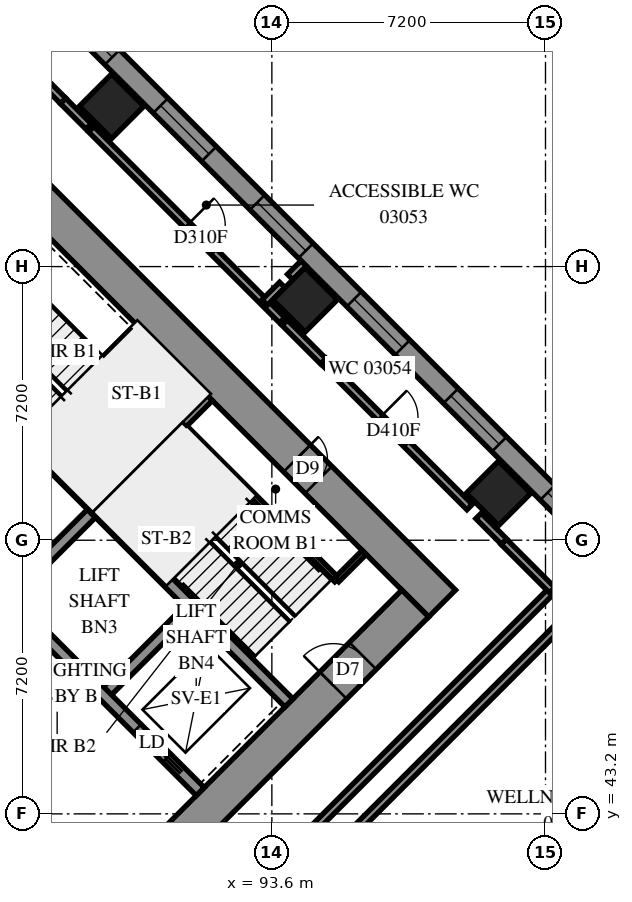
"""IFC4 building model, lengths in metres.
Left out: names, types, materials, properties, quantities, classifications, styles, units other than length and angle.
Written with IfcOpenShell. Run it as: python <this file> out.ifc"""

import sys

from ifc_helpers import new_model, si_unit, direction, frame, frame_2d, origin, origin_2d, place, context, subcontext, project, spatial, polyline, rectangle, outline, extrude, element, fill, save


model = new_model("IFC4")
c1 = context("Model", 3, precision=1e-05, world=origin(), true_north=direction((0.0, 1.0)))
c2 = subcontext(c1, "Body", "Model", "MODEL_VIEW")
j1 = project(units=[si_unit("LENGTHUNIT", "METRE"), si_unit("PLANEANGLEUNIT", "RADIAN")], contexts=[c1])
p1 = place(None, origin())
s1 = spatial("IfcSite", under=j1, at=p1, CompositionType="ELEMENT")
p2 = place(p1, origin())
s2 = spatial("IfcBuilding", under=s1, at=p2, CompositionType="ELEMENT")
p3 = place(p2, frame((0.0, 0.0, 14.4)))
s3 = spatial("IfcBuildingStorey", under=s2, at=p3, CompositionType="ELEMENT", Elevation=14.4)
for number, where, z_axis, x_axis in (
    (1, (89.382, 61.818, 0.0), (0.0, 0.0, 1.0), (0.707, -0.707, 0.0)),
    (2, (94.474, 56.727, 0.0), (0.0, 0.0, 1.0), (0.707, -0.707, 0.0)),
    (3, (99.565, 51.635, 0.0), (0.0, 0.0, 1.0), (0.707, -0.707, 0.0)),
):
    element("IfcColumn", number, at=place(p3, frame(where, z_axis=z_axis, x_axis=x_axis)), inside=s3, PredefinedType="COLUMN", context=c2, shape_type="SweptSolid", body=[
        extrude(rectangle(XDim=1.2, YDim=1.2, at=origin_2d()), origin(), (0.0, 0.0, 1.0), 3.8),
    ])
p4 = place(p3, frame((86.483, 60.333, -0.4), z_axis=(0.0, 0.0, 1.0), x_axis=(0.70710983, -0.7071037324, 0.0)))
e4 = element("IfcWall", 4, at=p4, inside=s3, PredefinedType="SHEAR", context=c2, shape_type="SweptSolid", body=[
    extrude(rectangle(XDim=16.4, YDim=1.0, at=frame_2d((8.2, 0.0))), origin(), (0.0, 0.0, 1.0), 3.5),
])
p5 = place(p4, frame((11.0, 0.0, 0.4)))
e5 = element("IfcOpeningElement", 5, at=p5, cuts=e4, PredefinedType="OPENING", context=c2, shape_type="SweptSolid", body=[
    extrude(rectangle(XDim=0.8, YDim=2.1, at=frame_2d((0.4, 1.05))), frame((0.0, 0.51, 0.0), z_axis=(0.0, -1.0, 0.0), x_axis=(1.0, 0.0, 0.0)), (0.0, 0.0, 1.0), 1.02),
])
p6 = place(p3, frame((87.19, 38.554, -0.4), z_axis=(0.0, 0.0, 1.0), x_axis=(0.707103309, 0.7071102534, 0.0)))
e6 = element("IfcWall", 6, at=p6, inside=s3, PredefinedType="SHEAR", context=c2, shape_type="SweptSolid", body=[
    extrude(rectangle(XDim=14.4, YDim=1.0, at=frame_2d((7.2, 0.0))), origin(), (0.0, 0.0, 1.0), 3.5),
])
p7 = place(p6, frame((4.55, 0.0, 0.4)))
e7 = element("IfcOpeningElement", 7, at=p7, cuts=e6, PredefinedType="OPENING", context=c2, shape_type="SweptSolid", body=[
    extrude(rectangle(XDim=1.1, YDim=2.1, at=frame_2d((0.55, 1.05))), frame((0.0, 0.51, 0.0), z_axis=(0.0, -1.0, 0.0), x_axis=(1.0, 0.0, 0.0)), (0.0, 0.0, 1.0), 1.02),
])
p8 = place(p6, frame((11.35, 0.0, 0.4)))
e8 = element("IfcOpeningElement", 8, at=p8, cuts=e6, PredefinedType="OPENING", context=c2, shape_type="SweptSolid", body=[
    extrude(rectangle(XDim=1.1, YDim=2.1, at=frame_2d((0.55, 1.05))), frame((0.0, 0.51, 0.0), z_axis=(0.0, -1.0, 0.0), x_axis=(1.0, 0.0, 0.0)), (0.0, 0.0, 1.0), 1.02),
])
for number, where, z_axis, x_axis in (
    (9, (86.625, 48.878, 0.0), (0.0, 0.0, 1.0), (0.707, 0.707, 0.0)),
    (10, (89.17, 46.332, 0.0), (0.0, 0.0, 1.0), (0.707, 0.707, 0.0)),
):
    element("IfcWall", number, at=place(p3, frame(where, z_axis=z_axis, x_axis=x_axis)), inside=s3, PredefinedType="SOLIDWALL", context=c2, shape_type="SweptSolid", body=[
        extrude(rectangle(XDim=3.3, YDim=0.3, at=frame_2d((1.65, 0.0))), origin(), (0.0, 0.0, 1.0), 3.8),
    ])
p9 = place(p3, frame((78.988, 51.423, 0.0), z_axis=(0.0, 0.0, 1.0), x_axis=(0.7071067812, -0.7071067812, 0.0)))
e11 = element("IfcWall", 11, at=p9, inside=s3, PredefinedType="SOLIDWALL", context=c2, shape_type="SweptSolid", body=[
    extrude(rectangle(XDim=14.4, YDim=0.3, at=frame_2d((7.2, 0.0))), origin(), (0.0, 0.0, 1.0), 3.8),
])
p10 = place(p9, frame((1.25, 0.0, 0.0)))
e12 = element("IfcOpeningElement", 12, at=p10, cuts=e11, PredefinedType="OPENING", context=c2, shape_type="SweptSolid", body=[
    extrude(rectangle(XDim=1.1, YDim=2.1, at=frame_2d((0.55, 1.05))), frame((0.0, 0.16, 0.0), z_axis=(0.0, -1.0, 0.0), x_axis=(1.0, 0.0, 0.0)), (0.0, 0.0, 1.0), 0.32),
])
p11 = place(p9, frame((4.85, 0.0, 0.0)))
e13 = element("IfcOpeningElement", 13, at=p11, cuts=e11, PredefinedType="OPENING", context=c2, shape_type="SweptSolid", body=[
    extrude(rectangle(XDim=1.1, YDim=2.1, at=frame_2d((0.55, 1.05))), frame((0.0, 0.16, 0.0), z_axis=(0.0, -1.0, 0.0), x_axis=(1.0, 0.0, 0.0)), (0.0, 0.0, 1.0), 0.32),
])
p12 = place(p9, frame((8.45, 0.0, 0.0)))
e14 = element("IfcOpeningElement", 14, at=p12, cuts=e11, PredefinedType="OPENING", context=c2, shape_type="SweptSolid", body=[
    extrude(rectangle(XDim=1.1, YDim=2.1, at=frame_2d((0.55, 1.05))), frame((0.0, 0.16, 0.0), z_axis=(0.0, -1.0, 0.0), x_axis=(1.0, 0.0, 0.0)), (0.0, 0.0, 1.0), 0.32),
])
p13 = place(p9, frame((12.05, 0.0, 0.0)))
e15 = element("IfcOpeningElement", 15, at=p13, cuts=e11, PredefinedType="OPENING", context=c2, shape_type="SweptSolid", body=[
    extrude(rectangle(XDim=1.1, YDim=2.1, at=frame_2d((0.55, 1.05))), frame((0.0, 0.16, 0.0), z_axis=(0.0, -1.0, 0.0), x_axis=(1.0, 0.0, 0.0)), (0.0, 0.0, 1.0), 0.32),
])
p14 = place(p3, frame((81.534, 53.969, 0.0), z_axis=(0.0, 0.0, 1.0), x_axis=(0.707103309, -0.7071102534, 0.0)))
e16 = element("IfcWall", 16, at=p14, inside=s3, PredefinedType="SOLIDWALL", context=c2, shape_type="SweptSolid", body=[
    extrude(rectangle(XDim=14.4, YDim=0.3, at=frame_2d((7.2, 0.0))), origin(), (0.0, 0.0, 1.0), 3.8),
])
p15 = place(p14, frame((12.05, 0.0, 0.0)))
e17 = element("IfcOpeningElement", 17, at=p15, cuts=e16, PredefinedType="OPENING", context=c2, shape_type="SweptSolid", body=[
    extrude(rectangle(XDim=1.1, YDim=2.1, at=frame_2d((0.55, 1.05))), frame((0.0, 0.16, 0.0), z_axis=(0.0, -1.0, 0.0), x_axis=(1.0, 0.0, 0.0)), (0.0, 0.0, 1.0), 0.32),
])
for number, where, z_axis, x_axis in (
    (18, (83.867, 56.302, 0.0), (0.0, 0.0, 1.0), (0.707, -0.707, 0.0)),
    (19, (88.958, 51.211, 0.0), (0.0, 0.0, 1.0), (0.707, -0.707, 0.0)),
):
    element("IfcWall", number, at=place(p3, frame(where, z_axis=z_axis, x_axis=x_axis)), inside=s3, PredefinedType="SOLIDWALL", context=c2, shape_type="SweptSolid", body=[
        extrude(rectangle(XDim=7.2, YDim=0.3, at=frame_2d((3.6, 0.0))), origin(), (0.0, 0.0, 1.0), 3.8),
    ])
p16 = place(p3, frame((88.958, 51.211, 0.0), z_axis=(0.0, 0.0, 1.0), x_axis=(0.7071067812, 0.7071067812, 0.0)))
e20 = element("IfcWall", 20, at=p16, inside=s3, PredefinedType="SOLIDWALL", context=c2, shape_type="SweptSolid", body=[
    extrude(rectangle(XDim=4.2, YDim=0.3, at=frame_2d((2.1, 0.0))), origin(), (0.0, 0.0, 1.0), 3.8),
])
p17 = place(p3, frame((117.843, 34.665, 0.0), z_axis=(0.0, 0.0, 1.0), x_axis=(-0.7071067812, 0.7071067812, 0.0)))
e21 = element("IfcWall", 21, at=p17, inside=s3, PredefinedType="SOLIDWALL", context=c2, shape_type="SweptSolid", body=[
    extrude(outline(polyline([(-0.275, -0.275), (54.222, -0.275), (53.994, 0.275), (0.275, 0.275), (-0.275, -0.275)])), origin(), (0.0, 0.0, 1.0), 3.8),
])
p18 = place(p17, frame((0.8, 0.0, 0.7)))
e22 = element("IfcOpeningElement", 22, at=p18, cuts=e21, PredefinedType="OPENING", context=c2, shape_type="SweptSolid", body=[
    extrude(rectangle(XDim=1.8, YDim=2.6, at=frame_2d((0.9, 1.3))), frame((0.0, 0.285, 0.0), z_axis=(0.0, -1.0, 0.0), x_axis=(1.0, 0.0, 0.0)), (0.0, 0.0, 1.0), 0.57),
])
p19 = place(p17, frame((4.225, 0.0, 0.7)))
e23 = element("IfcOpeningElement", 23, at=p19, cuts=e21, PredefinedType="OPENING", context=c2, shape_type="SweptSolid", body=[
    extrude(rectangle(XDim=1.8, YDim=2.6, at=frame_2d((0.9, 1.3))), frame((0.0, 0.285, 0.0), z_axis=(0.0, -1.0, 0.0), x_axis=(1.0, 0.0, 0.0)), (0.0, 0.0, 1.0), 0.57),
])
p20 = place(p17, frame((7.825, 0.0, 0.7)))
e24 = element("IfcOpeningElement", 24, at=p20, cuts=e21, PredefinedType="OPENING", context=c2, shape_type="SweptSolid", body=[
    extrude(rectangle(XDim=1.8, YDim=2.6, at=frame_2d((0.9, 1.3))), frame((0.0, 0.285, 0.0), z_axis=(0.0, -1.0, 0.0), x_axis=(1.0, 0.0, 0.0)), (0.0, 0.0, 1.0), 0.57),
])
p21 = place(p17, frame((11.425, 0.0, 0.7)))
e25 = element("IfcOpeningElement", 25, at=p21, cuts=e21, PredefinedType="OPENING", context=c2, shape_type="SweptSolid", body=[
    extrude(rectangle(XDim=1.8, YDim=2.6, at=frame_2d((0.9, 1.3))), frame((0.0, 0.285, 0.0), z_axis=(0.0, -1.0, 0.0), x_axis=(1.0, 0.0, 0.0)), (0.0, 0.0, 1.0), 0.57),
])
p22 = place(p17, frame((15.025, 0.0, 0.7)))
e26 = element("IfcOpeningElement", 26, at=p22, cuts=e21, PredefinedType="OPENING", context=c2, shape_type="SweptSolid", body=[
    extrude(rectangle(XDim=1.8, YDim=2.6, at=frame_2d((0.9, 1.3))), frame((0.0, 0.285, 0.0), z_axis=(0.0, -1.0, 0.0), x_axis=(1.0, 0.0, 0.0)), (0.0, 0.0, 1.0), 0.57),
])
p23 = place(p17, frame((18.625, 0.0, 0.7)))
e27 = element("IfcOpeningElement", 27, at=p23, cuts=e21, PredefinedType="OPENING", context=c2, shape_type="SweptSolid", body=[
    extrude(rectangle(XDim=1.8, YDim=2.6, at=frame_2d((0.9, 1.3))), frame((0.0, 0.285, 0.0), z_axis=(0.0, -1.0, 0.0), x_axis=(1.0, 0.0, 0.0)), (0.0, 0.0, 1.0), 0.57),
])
p24 = place(p17, frame((22.225, 0.0, 0.7)))
e28 = element("IfcOpeningElement", 28, at=p24, cuts=e21, PredefinedType="OPENING", context=c2, shape_type="SweptSolid", body=[
    extrude(rectangle(XDim=1.8, YDim=2.6, at=frame_2d((0.9, 1.3))), frame((0.0, 0.285, 0.0), z_axis=(0.0, -1.0, 0.0), x_axis=(1.0, 0.0, 0.0)), (0.0, 0.0, 1.0), 0.57),
])
p25 = place(p17, frame((25.825, 0.0, 0.7)))
e29 = element("IfcOpeningElement", 29, at=p25, cuts=e21, PredefinedType="OPENING", context=c2, shape_type="SweptSolid", body=[
    extrude(rectangle(XDim=1.8, YDim=2.6, at=frame_2d((0.9, 1.3))), frame((0.0, 0.285, 0.0), z_axis=(0.0, -1.0, 0.0), x_axis=(1.0, 0.0, 0.0)), (0.0, 0.0, 1.0), 0.57),
])
p26 = place(p17, frame((29.425, 0.0, 0.7)))
e30 = element("IfcOpeningElement", 30, at=p26, cuts=e21, PredefinedType="OPENING", context=c2, shape_type="SweptSolid", body=[
    extrude(rectangle(XDim=1.8, YDim=2.6, at=frame_2d((0.9, 1.3))), frame((0.0, 0.285, 0.0), z_axis=(0.0, -1.0, 0.0), x_axis=(1.0, 0.0, 0.0)), (0.0, 0.0, 1.0), 0.57),
])
p27 = place(p17, frame((33.025, 0.0, 0.7)))
e31 = element("IfcOpeningElement", 31, at=p27, cuts=e21, PredefinedType="OPENING", context=c2, shape_type="SweptSolid", body=[
    extrude(rectangle(XDim=1.8, YDim=2.6, at=frame_2d((0.9, 1.3))), frame((0.0, 0.285, 0.0), z_axis=(0.0, -1.0, 0.0), x_axis=(1.0, 0.0, 0.0)), (0.0, 0.0, 1.0), 0.57),
])
p28 = place(p17, frame((36.625, 0.0, 0.7)))
e32 = element("IfcOpeningElement", 32, at=p28, cuts=e21, PredefinedType="OPENING", context=c2, shape_type="SweptSolid", body=[
    extrude(rectangle(XDim=1.8, YDim=2.6, at=frame_2d((0.9, 1.3))), frame((0.0, 0.285, 0.0), z_axis=(0.0, -1.0, 0.0), x_axis=(1.0, 0.0, 0.0)), (0.0, 0.0, 1.0), 0.57),
])
p29 = place(p17, frame((40.225, 0.0, 0.7)))
e33 = element("IfcOpeningElement", 33, at=p29, cuts=e21, PredefinedType="OPENING", context=c2, shape_type="SweptSolid", body=[
    extrude(rectangle(XDim=1.8, YDim=2.6, at=frame_2d((0.9, 1.3))), frame((0.0, 0.285, 0.0), z_axis=(0.0, -1.0, 0.0), x_axis=(1.0, 0.0, 0.0)), (0.0, 0.0, 1.0), 0.57),
])
p30 = place(p17, frame((43.825, 0.0, 0.7)))
e34 = element("IfcOpeningElement", 34, at=p30, cuts=e21, PredefinedType="OPENING", context=c2, shape_type="SweptSolid", body=[
    extrude(rectangle(XDim=1.8, YDim=2.6, at=frame_2d((0.9, 1.3))), frame((0.0, 0.285, 0.0), z_axis=(0.0, -1.0, 0.0), x_axis=(1.0, 0.0, 0.0)), (0.0, 0.0, 1.0), 0.57),
])
p31 = place(p17, frame((47.425, 0.0, 0.7)))
e35 = element("IfcOpeningElement", 35, at=p31, cuts=e21, PredefinedType="OPENING", context=c2, shape_type="SweptSolid", body=[
    extrude(rectangle(XDim=1.8, YDim=2.6, at=frame_2d((0.9, 1.3))), frame((0.0, 0.285, 0.0), z_axis=(0.0, -1.0, 0.0), x_axis=(1.0, 0.0, 0.0)), (0.0, 0.0, 1.0), 0.57),
])
p32 = place(p17, frame((51.06, 0.0, 0.7)))
e36 = element("IfcOpeningElement", 36, at=p32, cuts=e21, PredefinedType="OPENING", context=c2, shape_type="SweptSolid", body=[
    extrude(rectangle(XDim=1.8, YDim=2.6, at=frame_2d((0.9, 1.3))), frame((0.0, 0.285, 0.0), z_axis=(0.0, -1.0, 0.0), x_axis=(1.0, 0.0, 0.0)), (0.0, 0.0, 1.0), 0.57),
])
p33 = place(p3, frame((91.313, 53.354, 0.0), z_axis=(0.0, 0.0, 1.0), x_axis=(0.7071067812, -0.7071067812, 0.0)))
e37 = element("IfcWall", 37, at=p33, inside=s3, PredefinedType="PARTITIONING", context=c2, shape_type="SweptSolid", body=[
    extrude(rectangle(XDim=5.65, YDim=0.15, at=frame_2d((2.825, 0.0))), origin(), (0.0, 0.0, 1.0), 3.8),
])
p34 = place(p3, frame((95.308, 49.358, 0.0), z_axis=(0.0, 0.0, 1.0), x_axis=(0.70705776, 0.707155799, 0.0)))
e38 = element("IfcWall", 38, at=p34, inside=s3, PredefinedType="PARTITIONING", context=c2, shape_type="SweptSolid", body=[
    extrude(rectangle(XDim=1.02, YDim=0.15, at=frame_2d((0.51, 0.0))), origin(), (0.0, 0.0, 1.0), 3.8),
])
for number, where, z_axis, x_axis in (
    (39, (95.109, 42.091, 0.0), (0.0, 0.0, 1.0), (0.707, 0.707, 0.0)),
    (40, (100.201, 36.999, 0.0), (0.0, 0.0, 1.0), (0.707, 0.707, 0.0)),
):
    element("IfcWall", number, at=place(p3, frame(where, z_axis=z_axis, x_axis=x_axis)), inside=s3, PredefinedType="PARTITIONING", context=c2, shape_type="SweptSolid", body=[
        extrude(rectangle(XDim=10.55, YDim=0.2, at=frame_2d((5.275, 0.0))), origin(), (0.0, 0.0, 1.0), 3.8),
    ])
p35 = place(p3, frame((94.544, 42.656, 0.0), z_axis=(0.0, 0.0, 1.0), x_axis=(0.7071067812, 0.7071067812, 0.0)))
e41 = element("IfcWall", 41, at=p35, inside=s3, PredefinedType="PARTITIONING", context=c2, shape_type="SweptSolid", body=[
    extrude(rectangle(XDim=9.099, YDim=0.2, at=frame_2d((4.55, 0.0))), origin(), (0.0, 0.0, 1.0), 3.8),
])
p36 = place(p3, frame((88.847, 61.215, 0.0), z_axis=(0.0, 0.0, 1.0), x_axis=(0.7071067812, -0.7071067812, 0.0)))
e42 = element("IfcWall", 42, at=p36, inside=s3, PredefinedType="PARTITIONING", context=c2, shape_type="SweptSolid", body=[
    extrude(rectangle(XDim=7.105, YDim=0.2, at=frame_2d((3.553, 0.0))), origin(), (0.0, 0.0, 1.0), 3.8),
])
p37 = place(p36, frame((3.571, 0.0, 0.0)))
e43 = element("IfcOpeningElement", 43, at=p37, cuts=e42, PredefinedType="OPENING", context=c2, shape_type="SweptSolid", body=[
    extrude(rectangle(XDim=1.0, YDim=2.1, at=frame_2d((0.5, 1.05))), frame((0.0, 0.11, 0.0), z_axis=(0.0, -1.0, 0.0), x_axis=(1.0, 0.0, 0.0)), (0.0, 0.0, 1.0), 0.22),
])
p38 = place(p3, frame((94.955, 55.119, 0.0), z_axis=(0.0, 0.0, 1.0), x_axis=(0.7072721884, -0.7069413352, 0.0)))
e44 = element("IfcWall", 44, at=p38, inside=s3, PredefinedType="PARTITIONING", context=c2, shape_type="SweptSolid", body=[
    extrude(rectangle(XDim=5.441, YDim=0.2, at=frame_2d((2.72, 0.0))), origin(), (0.0, 0.0, 1.0), 3.8),
])
p39 = place(p38, frame((2.106, 0.0, 0.0)))
e45 = element("IfcOpeningElement", 45, at=p39, cuts=e44, PredefinedType="OPENING", context=c2, shape_type="SweptSolid", body=[
    extrude(rectangle(XDim=1.0, YDim=2.1, at=frame_2d((0.5, 1.05))), frame((0.0, 0.11, 0.0), z_axis=(0.0, -1.0, 0.0), x_axis=(1.0, 0.0, 0.0)), (0.0, 0.0, 1.0), 0.22),
])
p40 = place(p3, frame((86.835, 63.231, 0.0), z_axis=(0.0, 0.0, 1.0), x_axis=(0.7076620277, -0.7065510983, 0.0)))
e46 = element("IfcWall", 46, at=p40, inside=s3, PredefinedType="PARTITIONING", context=c2, shape_type="SweptSolid", body=[
    extrude(rectangle(XDim=1.8, YDim=0.2, at=frame_2d((0.9, 0.0))), origin(), (0.0, 0.0, 1.0), 3.8),
])
p41 = place(p3, frame((99.703, 50.359, 0.0), z_axis=(0.0, 0.0, 1.0), x_axis=(0.7071067812, -0.7071067812, 0.0)))
e47 = element("IfcWall", 47, at=p41, inside=s3, PredefinedType="PARTITIONING", context=c2, shape_type="SweptSolid", body=[
    extrude(rectangle(XDim=1.799, YDim=0.2, at=frame_2d((0.899, 0.0))), origin(), (0.0, 0.0, 1.0), 3.8),
])
p42 = place(p3, frame((93.939, 56.123, 0.0), z_axis=(0.0, 0.0, 1.0), x_axis=(0.7071067812, -0.7071067812, 0.0)))
e48 = element("IfcWall", 48, at=p42, inside=s3, PredefinedType="PARTITIONING", context=c2, shape_type="SweptSolid", body=[
    extrude(rectangle(XDim=1.428, YDim=0.2, at=frame_2d((0.714, 0.0))), origin(), (0.0, 0.0, 1.0), 3.8),
])
for number, where, z_axis, x_axis in (
    (49, (88.108, 61.958, 0.0), (0.0, 0.0, 1.0), (0.706, -0.708, 0.0)),
    (50, (99.037, 51.039, 0.0), (0.0, 0.0, 1.0), (0.706, -0.708, 0.0)),
):
    element("IfcWall", number, at=place(p3, frame(where, z_axis=z_axis, x_axis=x_axis)), inside=s3, PredefinedType="PARTITIONING", context=c2, shape_type="SweptSolid", body=[
        extrude(rectangle(XDim=0.952, YDim=0.2, at=frame_2d((0.476, 0.0))), origin(), (0.0, 0.0, 1.0), 3.8),
    ])
p43 = place(p3, frame((93.412, 56.656, 0.0), z_axis=(0.0, 0.0, 1.0), x_axis=(0.7071067812, 0.7071067812, 0.0)))
e51 = element("IfcWall", 51, at=p43, inside=s3, PredefinedType="PARTITIONING", context=c2, shape_type="SweptSolid", body=[
    extrude(rectangle(XDim=0.653, YDim=0.2, at=frame_2d((0.327, 0.0))), origin(), (0.0, 0.0, 1.0), 3.8),
])
p44 = place(p3, frame((94.082, 57.326, 0.0), z_axis=(0.0, 0.0, 1.0), x_axis=(0.7071067812, 0.7071067812, 0.0)))
e52 = element("IfcWall", 52, at=p44, inside=s3, PredefinedType="PARTITIONING", context=c2, shape_type="SweptSolid", body=[
    extrude(rectangle(XDim=0.503, YDim=0.2, at=frame_2d((0.252, 0.0))), origin(), (0.0, 0.0, 1.0), 3.8),
])
p45 = place(p24, origin())
e53 = element("IfcWindow", 53, at=p45, inside=s3, PartitioningType="SINGLE_PANEL", PredefinedType="WINDOW", context=c2, shape_type="SweptSolid", body=[
    extrude(rectangle(XDim=1.8, YDim=2.6, at=frame_2d((0.9, 1.3))), frame((0.0, 0.155, 0.0), z_axis=(0.0, -1.0, 0.0), x_axis=(1.0, 0.0, 0.0)), (0.0, 0.0, 1.0), 0.06),
])
fill(e28, e53)
p46 = place(p25, origin())
e54 = element("IfcWindow", 54, at=p46, inside=s3, PartitioningType="SINGLE_PANEL", PredefinedType="WINDOW", context=c2, shape_type="SweptSolid", body=[
    extrude(rectangle(XDim=1.8, YDim=2.6, at=frame_2d((0.9, 1.3))), frame((0.0, 0.155, 0.0), z_axis=(0.0, -1.0, 0.0), x_axis=(1.0, 0.0, 0.0)), (0.0, 0.0, 1.0), 0.06),
])
fill(e29, e54)
p47 = place(p26, origin())
e55 = element("IfcWindow", 55, at=p47, inside=s3, PartitioningType="SINGLE_PANEL", PredefinedType="WINDOW", context=c2, shape_type="SweptSolid", body=[
    extrude(rectangle(XDim=1.8, YDim=2.6, at=frame_2d((0.9, 1.3))), frame((0.0, 0.155, 0.0), z_axis=(0.0, -1.0, 0.0), x_axis=(1.0, 0.0, 0.0)), (0.0, 0.0, 1.0), 0.06),
])
fill(e30, e55)
p48 = place(p27, origin())
e56 = element("IfcWindow", 56, at=p48, inside=s3, PartitioningType="SINGLE_PANEL", PredefinedType="WINDOW", context=c2, shape_type="SweptSolid", body=[
    extrude(rectangle(XDim=1.8, YDim=2.6, at=frame_2d((0.9, 1.3))), frame((0.0, 0.155, 0.0), z_axis=(0.0, -1.0, 0.0), x_axis=(1.0, 0.0, 0.0)), (0.0, 0.0, 1.0), 0.06),
])
fill(e31, e56)
p49 = place(p28, origin())
e57 = element("IfcWindow", 57, at=p49, inside=s3, PartitioningType="SINGLE_PANEL", PredefinedType="WINDOW", context=c2, shape_type="SweptSolid", body=[
    extrude(rectangle(XDim=1.8, YDim=2.6, at=frame_2d((0.9, 1.3))), frame((0.0, 0.155, 0.0), z_axis=(0.0, -1.0, 0.0), x_axis=(1.0, 0.0, 0.0)), (0.0, 0.0, 1.0), 0.06),
])
fill(e32, e57)
p50 = place(p29, origin())
e58 = element("IfcWindow", 58, at=p50, inside=s3, PartitioningType="SINGLE_PANEL", PredefinedType="WINDOW", context=c2, shape_type="SweptSolid", body=[
    extrude(rectangle(XDim=1.8, YDim=2.6, at=frame_2d((0.9, 1.3))), frame((0.0, 0.155, 0.0), z_axis=(0.0, -1.0, 0.0), x_axis=(1.0, 0.0, 0.0)), (0.0, 0.0, 1.0), 0.06),
])
fill(e33, e58)
p51 = place(p5, origin())
e59 = element("IfcDoor", 59, at=p51, inside=s3, OperationType="SINGLE_SWING_RIGHT", PredefinedType="DOOR", context=c2, shape_type="SweptSolid", body=[
    extrude(rectangle(XDim=0.8, YDim=2.1, at=frame_2d((0.4, 1.05))), frame((0.0, -0.44, 0.0), z_axis=(0.0, -1.0, 0.0), x_axis=(1.0, 0.0, 0.0)), (0.0, 0.0, 1.0), 0.05),
])
fill(e5, e59)
p52 = place(p8, origin())
e60 = element("IfcDoor", 60, at=p52, inside=s3, OperationType="SINGLE_SWING_RIGHT", PredefinedType="DOOR", context=c2, shape_type="SweptSolid", body=[
    extrude(rectangle(XDim=1.1, YDim=2.1, at=frame_2d((0.55, 1.05))), frame((0.0, 0.025, 0.0), z_axis=(0.0, -1.0, 0.0), x_axis=(1.0, 0.0, 0.0)), (0.0, 0.0, 1.0), 0.05),
])
fill(e8, e60)
p53 = place(p15, origin())
e61 = element("IfcDoor", 61, at=p53, inside=s3, OperationType="SLIDING_TO_RIGHT", PredefinedType="DOOR", context=c2, shape_type="SweptSolid", body=[
    extrude(rectangle(XDim=1.1, YDim=2.1, at=frame_2d((0.55, 1.05))), frame((0.0, 0.025, 0.0), z_axis=(0.0, -1.0, 0.0), x_axis=(1.0, 0.0, 0.0)), (0.0, 0.0, 1.0), 0.05),
])
fill(e17, e61)
p54 = place(p37, origin())
e62 = element("IfcDoor", 62, at=p54, inside=s3, OperationType="SINGLE_SWING_LEFT", PredefinedType="DOOR", context=c2, shape_type="SweptSolid", body=[
    extrude(rectangle(XDim=1.0, YDim=2.1, at=frame_2d((0.5, 1.05))), frame((0.0, 0.025, 0.0), z_axis=(0.0, -1.0, 0.0), x_axis=(1.0, 0.0, 0.0)), (0.0, 0.0, 1.0), 0.05),
])
fill(e43, e62)
p55 = place(p39, origin())
e63 = element("IfcDoor", 63, at=p55, inside=s3, OperationType="SINGLE_SWING_LEFT", PredefinedType="DOOR", context=c2, shape_type="SweptSolid", body=[
    extrude(rectangle(XDim=1.0, YDim=2.1, at=frame_2d((0.5, 1.05))), frame((0.0, 0.025, 0.0), z_axis=(0.0, -1.0, 0.0), x_axis=(1.0, 0.0, 0.0)), (0.0, 0.0, 1.0), 0.05),
])
fill(e45, e63)
save(model, sys.argv[1])
